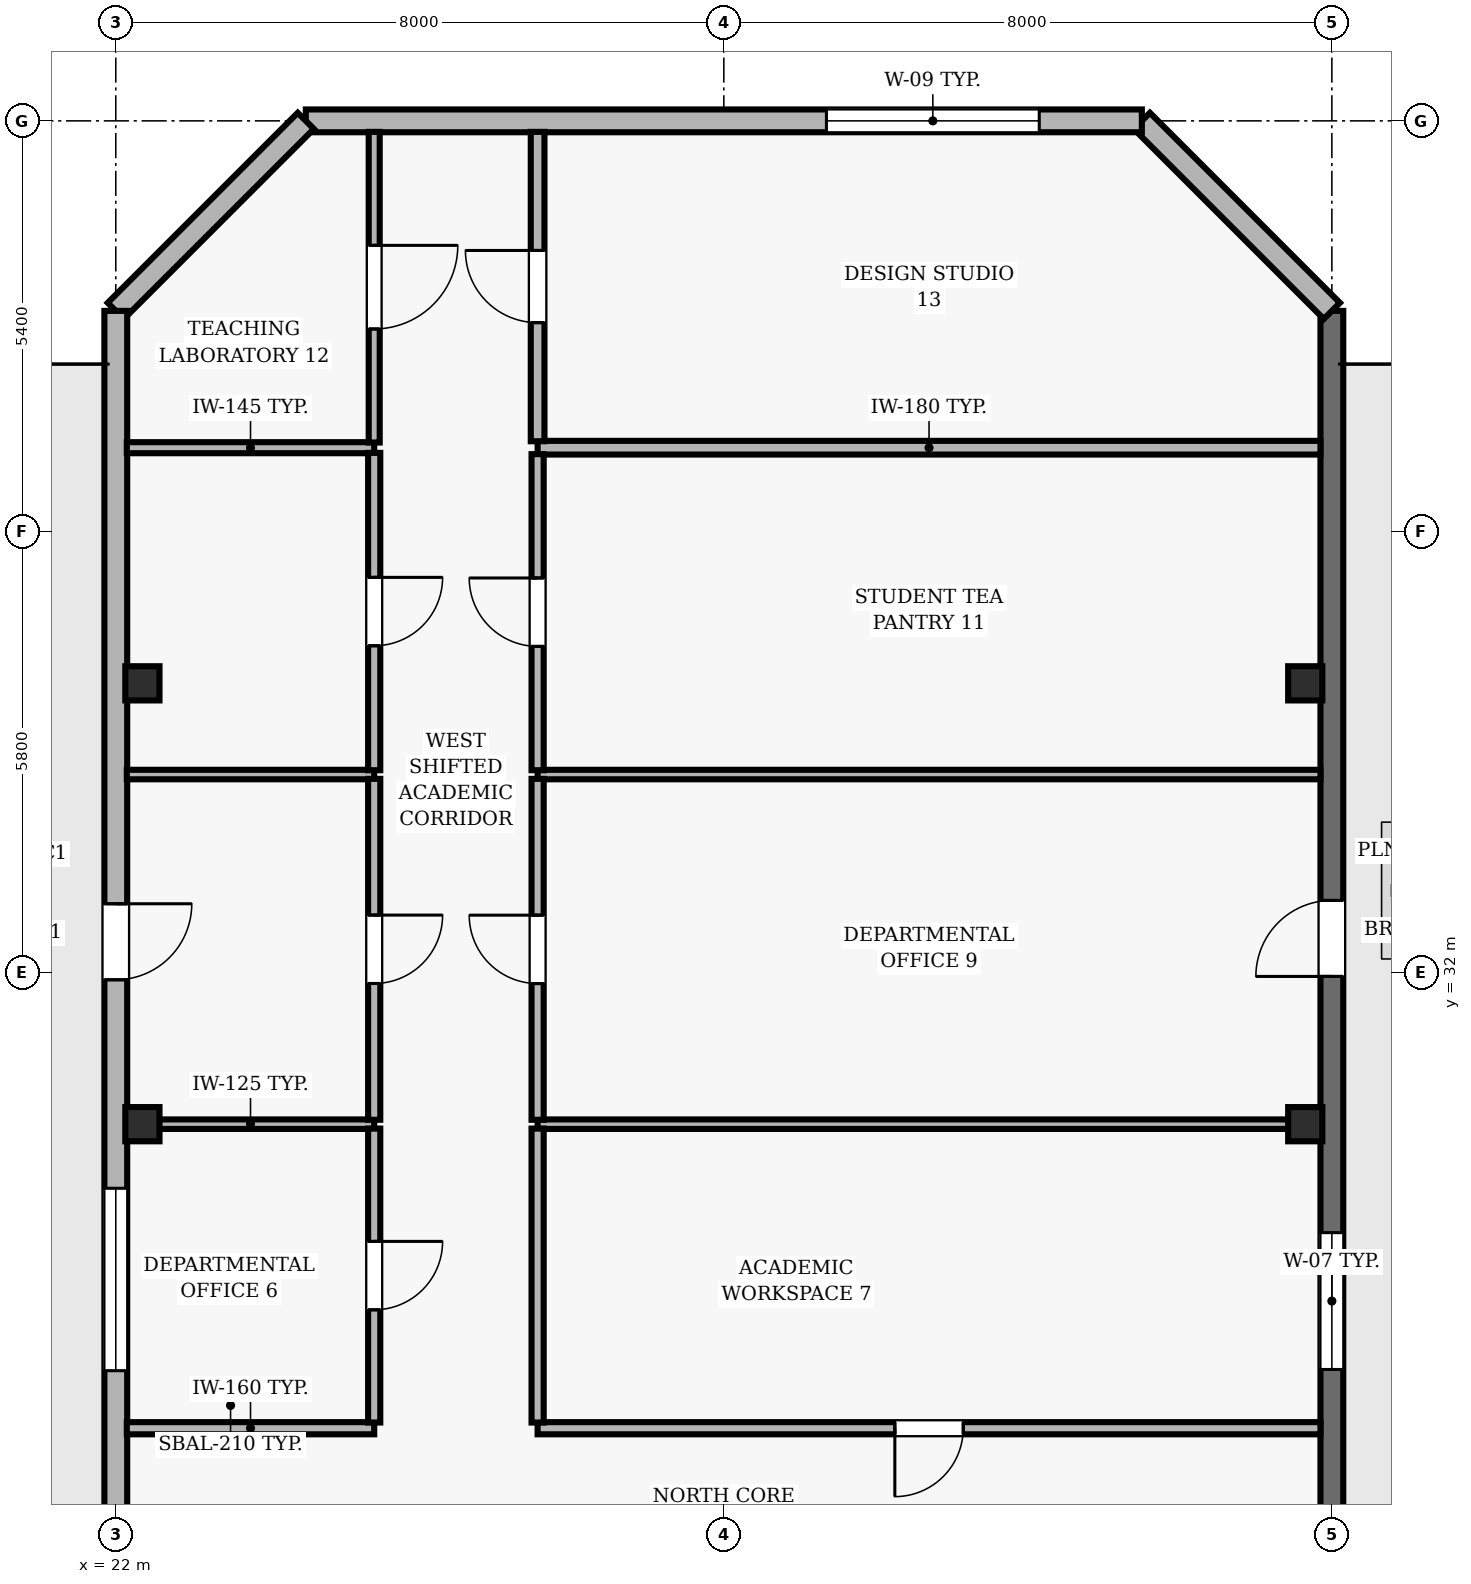
"""IFC4 building model, lengths in metres.
Left out: names, types, materials, properties, quantities, classifications, styles, units other than length and angle.
Written with IfcOpenShell. Run it as: python <this file> out.ifc"""

import sys

from ifc_helpers import new_model, si_unit, direction, frame, frame_2d, origin, origin_2d, place, context, subcontext, project, spatial, rectangle, hollow_rectangle, extrude, element, fill, save


model = new_model("IFC4")
c1 = context("Model", 3, precision=1e-05, world=origin(), true_north=direction((0.0, 1.0)))
c2 = subcontext(c1, "Body", "Model", "MODEL_VIEW")
j1 = project(units=[si_unit("LENGTHUNIT", "METRE"), si_unit("PLANEANGLEUNIT", "RADIAN")], contexts=[c1])
p1 = place(None, origin())
s1 = spatial("IfcSite", under=j1, at=p1, CompositionType="ELEMENT")
p2 = place(p1, origin())
s2 = spatial("IfcBuilding", under=s1, at=p2, CompositionType="ELEMENT")
p3 = place(p2, frame((0.0, 0.0, 191.4)))
s3 = spatial("IfcBuildingStorey", under=s2, at=p3, CompositionType="ELEMENT", Elevation=191.4)
for number, where, z_axis, x_axis in (
    (1, (22.35, 30.0, 0.0), (0.0, 0.0, 1.0), (1.0, 0.0, 0.0)),
    (2, (37.65, 30.0, 0.0), (0.0, 0.0, 1.0), (1.0, 0.0, 0.0)),
    (3, (22.35, 35.8, 0.0), (0.0, 0.0, 1.0), (1.0, 0.0, 0.0)),
    (4, (37.65, 35.8, 0.0), (0.0, 0.0, 1.0), (1.0, 0.0, 0.0)),
):
    element("IfcColumn", number, at=place(p3, frame(where, z_axis=z_axis, x_axis=x_axis)), inside=s3, PredefinedType="COLUMN", context=c2, shape_type="SweptSolid", body=[
        extrude(hollow_rectangle(XDim=0.45, YDim=0.45, WallThickness=0.02, at=origin_2d()), origin(), (0.0, 0.0, 1.0), 3.9),
    ])
p4 = place(p3, frame((38.0, 23.988, 0.0), z_axis=(0.0, 0.0, 1.0), x_axis=(0.0, 1.0, 0.0)))
e5 = element("IfcWall", 5, at=p4, inside=s3, PredefinedType="SOLIDWALL", context=c2, shape_type="SweptSolid", body=[
    extrude(rectangle(XDim=16.712, YDim=0.3, at=frame_2d((8.356, 0.0))), origin(), (0.0, 0.0, 1.0), 3.69),
])
p5 = place(p4, frame((7.956, 0.0, 0.0)))
e6 = element("IfcOpeningElement", 6, at=p5, cuts=e5, PredefinedType="OPENING", context=c2, shape_type="SweptSolid", body=[
    extrude(rectangle(XDim=1.0, YDim=2.2, at=frame_2d((0.5, 1.1))), frame((0.0, 0.16, 0.0), z_axis=(0.0, -1.0, 0.0), x_axis=(1.0, 0.0, 0.0)), (0.0, 0.0, 1.0), 0.32),
])
p6 = place(p4, frame((2.785, 0.0, 0.9)))
e7 = element("IfcOpeningElement", 7, at=p6, cuts=e5, PredefinedType="OPENING", context=c2, shape_type="SweptSolid", body=[
    extrude(rectangle(XDim=1.8, YDim=1.8, at=frame_2d((0.9, 0.9))), frame((0.0, 0.16, 0.0), z_axis=(0.0, -1.0, 0.0), x_axis=(1.0, 0.0, 0.0)), (0.0, 0.0, 1.0), 0.32),
])
p7 = place(p3, frame((38.0, 40.7, 0.0), z_axis=(0.0, 0.0, 1.0), x_axis=(-0.707106781187, 0.707106781187, 0.0)))
e8 = element("IfcWall", 8, at=p7, inside=s3, PredefinedType="SOLIDWALL", context=c2, shape_type="SweptSolid", body=[
    extrude(rectangle(XDim=3.536, YDim=0.3, at=frame_2d((1.768, 0.0))), origin(), (0.0, 0.0, 1.0), 3.69),
])
p8 = place(p3, frame((35.5, 43.2, 0.0), z_axis=(0.0, 0.0, 1.0), x_axis=(-1.0, 0.0, 0.0)))
e9 = element("IfcWall", 9, at=p8, inside=s3, PredefinedType="SOLIDWALL", context=c2, shape_type="SweptSolid", body=[
    extrude(rectangle(XDim=11.0, YDim=0.3, at=frame_2d((5.5, 0.0))), origin(), (0.0, 0.0, 1.0), 3.69),
])
p9 = place(p8, frame((1.35, 0.0, 0.9)))
e10 = element("IfcOpeningElement", 10, at=p9, cuts=e9, PredefinedType="OPENING", context=c2, shape_type="SweptSolid", body=[
    extrude(rectangle(XDim=2.8, YDim=1.8, at=frame_2d((1.4, 0.9))), frame((0.0, 0.16, 0.0), z_axis=(0.0, -1.0, 0.0), x_axis=(1.0, 0.0, 0.0)), (0.0, 0.0, 1.0), 0.32),
])
p10 = place(p3, frame((24.5, 43.2, 0.0), z_axis=(0.0, 0.0, 1.0), x_axis=(-0.707106781187, -0.707106781187, 0.0)))
e11 = element("IfcWall", 11, at=p10, inside=s3, PredefinedType="SOLIDWALL", context=c2, shape_type="SweptSolid", body=[
    extrude(rectangle(XDim=3.536, YDim=0.3, at=frame_2d((1.768, 0.0))), origin(), (0.0, 0.0, 1.0), 3.69),
])
p11 = place(p3, frame((22.0, 40.7, 0.0), z_axis=(0.0, 0.0, 1.0), x_axis=(0.0, -1.0, 0.0)))
e12 = element("IfcWall", 12, at=p11, inside=s3, PredefinedType="SOLIDWALL", context=c2, shape_type="SweptSolid", body=[
    extrude(rectangle(XDim=38.2, YDim=0.3, at=frame_2d((19.1, 0.0))), origin(), (0.0, 0.0, 1.0), 3.69),
])
p12 = place(p11, frame((7.8, 0.0, 0.0)))
e13 = element("IfcOpeningElement", 13, at=p12, cuts=e12, PredefinedType="OPENING", context=c2, shape_type="SweptSolid", body=[
    extrude(rectangle(XDim=1.0, YDim=2.2, at=frame_2d((0.5, 1.1))), frame((0.0, 0.16, 0.0), z_axis=(0.0, -1.0, 0.0), x_axis=(1.0, 0.0, 0.0)), (0.0, 0.0, 1.0), 0.32),
])
p13 = place(p11, frame((11.543, 0.0, 0.9)))
e14 = element("IfcOpeningElement", 14, at=p13, cuts=e12, PredefinedType="OPENING", context=c2, shape_type="SweptSolid", body=[
    extrude(rectangle(XDim=2.4, YDim=2.2, at=frame_2d((1.2, 1.1))), frame((0.0, 0.16, 0.0), z_axis=(0.0, -1.0, 0.0), x_axis=(1.0, 0.0, 0.0)), (0.0, 0.0, 1.0), 0.32),
])
p14 = place(p11, frame((18.35, 0.0, 0.9)))
e15 = element("IfcOpeningElement", 15, at=p14, cuts=e12, PredefinedType="OPENING", context=c2, shape_type="SweptSolid", body=[
    extrude(rectangle(XDim=2.4, YDim=2.2, at=frame_2d((1.2, 1.1))), frame((0.0, 0.16, 0.0), z_axis=(0.0, -1.0, 0.0), x_axis=(1.0, 0.0, 0.0)), (0.0, 0.0, 1.0), 0.32),
])
p15 = place(p11, frame((22.907, 0.0, 0.9)))
e16 = element("IfcOpeningElement", 16, at=p15, cuts=e12, PredefinedType="OPENING", context=c2, shape_type="SweptSolid", body=[
    extrude(rectangle(XDim=2.4, YDim=2.2, at=frame_2d((1.2, 1.1))), frame((0.0, 0.16, 0.0), z_axis=(0.0, -1.0, 0.0), x_axis=(1.0, 0.0, 0.0)), (0.0, 0.0, 1.0), 0.32),
])
p16 = place(p11, frame((28.814, 0.0, 0.9)))
e17 = element("IfcOpeningElement", 17, at=p16, cuts=e12, PredefinedType="OPENING", context=c2, shape_type="SweptSolid", body=[
    extrude(rectangle(XDim=2.4, YDim=2.2, at=frame_2d((1.2, 1.1))), frame((0.0, 0.16, 0.0), z_axis=(0.0, -1.0, 0.0), x_axis=(1.0, 0.0, 0.0)), (0.0, 0.0, 1.0), 0.32),
])
p17 = place(p3, frame((25.4, 26.0, 0.0), z_axis=(0.0, 0.0, 1.0), x_axis=(-1.0, 0.0, 0.0)))
e18 = element("IfcWall", 18, at=p17, inside=s3, PredefinedType="PARTITIONING", context=c2, shape_type="SweptSolid", body=[
    extrude(rectangle(XDim=3.255, YDim=0.16, at=frame_2d((1.627, 0.0))), origin(), (0.0, 0.0, 1.0), 3.69),
])
p18 = place(p3, frame((25.4, 30.0, 0.0), z_axis=(0.0, 0.0, 1.0), x_axis=(-1.0, 0.0, 0.0)))
e19 = element("IfcWall", 19, at=p18, inside=s3, PredefinedType="PARTITIONING", context=c2, shape_type="SweptSolid", body=[
    extrude(rectangle(XDim=3.255, YDim=0.125, at=frame_2d((1.627, 0.0))), origin(), (0.0, 0.0, 1.0), 3.139),
])
p19 = place(p3, frame((25.4, 34.6, 0.0), z_axis=(0.0, 0.0, 1.0), x_axis=(-1.0, 0.0, 0.0)))
e20 = element("IfcWall", 20, at=p19, inside=s3, PredefinedType="PARTITIONING", context=c2, shape_type="SweptSolid", body=[
    extrude(rectangle(XDim=3.255, YDim=0.125, at=frame_2d((1.627, 0.0))), origin(), (0.0, 0.0, 1.0), 3.69),
])
p20 = place(p3, frame((25.4, 38.9, 0.0), z_axis=(0.0, 0.0, 1.0), x_axis=(-1.0, 0.0, 0.0)))
e21 = element("IfcWall", 21, at=p20, inside=s3, PredefinedType="PARTITIONING", context=c2, shape_type="SweptSolid", body=[
    extrude(rectangle(XDim=3.255, YDim=0.145, at=frame_2d((1.627, 0.0))), origin(), (0.0, 0.0, 1.0), 3.69),
])
p21 = place(p3, frame((37.85, 26.0, 0.0), z_axis=(0.0, 0.0, 1.0), x_axis=(-1.0, 0.0, 0.0)))
e22 = element("IfcWall", 22, at=p21, inside=s3, PredefinedType="PARTITIONING", context=c2, shape_type="SweptSolid", body=[
    extrude(rectangle(XDim=10.3, YDim=0.16, at=frame_2d((5.15, 0.0))), origin(), (0.0, 0.0, 1.0), 3.69),
])
p22 = place(p21, frame((4.7, 0.0, 0.0)))
e23 = element("IfcOpeningElement", 23, at=p22, cuts=e22, PredefinedType="OPENING", context=c2, shape_type="SweptSolid", body=[
    extrude(rectangle(XDim=0.9, YDim=2.1, at=frame_2d((0.45, 1.05))), frame((0.0, 0.09, 0.0), z_axis=(0.0, -1.0, 0.0), x_axis=(1.0, 0.0, 0.0)), (0.0, 0.0, 1.0), 0.18),
])
p23 = place(p3, frame((37.85, 30.0, 0.0), z_axis=(0.0, 0.0, 1.0), x_axis=(-1.0, 0.0, 0.0)))
e24 = element("IfcWall", 24, at=p23, inside=s3, PredefinedType="PARTITIONING", context=c2, shape_type="SweptSolid", body=[
    extrude(rectangle(XDim=10.3, YDim=0.125, at=frame_2d((5.15, 0.0))), origin(), (0.0, 0.0, 1.0), 3.139),
])
p24 = place(p3, frame((37.85, 34.6, 0.0), z_axis=(0.0, 0.0, 1.0), x_axis=(-1.0, 0.0, 0.0)))
e25 = element("IfcWall", 25, at=p24, inside=s3, PredefinedType="PARTITIONING", context=c2, shape_type="SweptSolid", body=[
    extrude(rectangle(XDim=10.3, YDim=0.125, at=frame_2d((5.15, 0.0))), origin(), (0.0, 0.0, 1.0), 3.69),
])
p25 = place(p3, frame((37.85, 38.9, 0.0), z_axis=(0.0, 0.0, 1.0), x_axis=(-1.0, 0.0, 0.0)))
e26 = element("IfcWall", 26, at=p25, inside=s3, PredefinedType="PARTITIONING", context=c2, shape_type="SweptSolid", body=[
    extrude(rectangle(XDim=10.3, YDim=0.18, at=frame_2d((5.15, 0.0))), origin(), (0.0, 0.0, 1.0), 3.69),
])
p26 = place(p3, frame((25.4, 29.942, 0.0), z_axis=(0.0, 0.0, 1.0), x_axis=(0.0, -1.0, 0.0)))
e27 = element("IfcWall", 27, at=p26, inside=s3, PredefinedType="PARTITIONING", context=c2, shape_type="SweptSolid", body=[
    extrude(rectangle(XDim=3.867, YDim=0.16, at=frame_2d((1.934, 0.0))), origin(), (0.0, 0.0, 1.0), 3.69),
])
p27 = place(p26, frame((1.484, 0.0, 0.0)))
e28 = element("IfcOpeningElement", 28, at=p27, cuts=e27, PredefinedType="OPENING", context=c2, shape_type="SweptSolid", body=[
    extrude(rectangle(XDim=0.9, YDim=2.1, at=frame_2d((0.45, 1.05))), frame((0.0, 0.09, 0.0), z_axis=(0.0, -1.0, 0.0), x_axis=(1.0, 0.0, 0.0)), (0.0, 0.0, 1.0), 0.18),
])
p28 = place(p3, frame((25.4, 34.543, 0.0), z_axis=(0.0, 0.0, 1.0), x_axis=(0.0, -1.0, 0.0)))
e29 = element("IfcWall", 29, at=p28, inside=s3, PredefinedType="PARTITIONING", context=c2, shape_type="SweptSolid", body=[
    extrude(rectangle(XDim=4.485, YDim=0.16, at=frame_2d((2.242, 0.0))), origin(), (0.0, 0.0, 1.0), 3.69),
])
p29 = place(p28, frame((1.792, 0.0, 0.0)))
e30 = element("IfcOpeningElement", 30, at=p29, cuts=e29, PredefinedType="OPENING", context=c2, shape_type="SweptSolid", body=[
    extrude(rectangle(XDim=0.9, YDim=2.1, at=frame_2d((0.45, 1.05))), frame((0.0, 0.09, 0.0), z_axis=(0.0, -1.0, 0.0), x_axis=(1.0, 0.0, 0.0)), (0.0, 0.0, 1.0), 0.18),
])
p30 = place(p3, frame((25.4, 38.832, 0.0), z_axis=(0.0, 0.0, 1.0), x_axis=(0.0, -1.0, 0.0)))
e31 = element("IfcWall", 31, at=p30, inside=s3, PredefinedType="PARTITIONING", context=c2, shape_type="SweptSolid", body=[
    extrude(rectangle(XDim=4.175, YDim=0.16, at=frame_2d((2.087, 0.0))), origin(), (0.0, 0.0, 1.0), 3.69),
])
p31 = place(p30, frame((1.638, 0.0, 0.0)))
e32 = element("IfcOpeningElement", 32, at=p31, cuts=e31, PredefinedType="OPENING", context=c2, shape_type="SweptSolid", body=[
    extrude(rectangle(XDim=0.9, YDim=2.1, at=frame_2d((0.45, 1.05))), frame((0.0, 0.09, 0.0), z_axis=(0.0, -1.0, 0.0), x_axis=(1.0, 0.0, 0.0)), (0.0, 0.0, 1.0), 0.18),
])
p32 = place(p3, frame((25.4, 43.055, 0.0), z_axis=(0.0, 0.0, 1.0), x_axis=(0.0, -1.0, 0.0)))
e33 = element("IfcWall", 33, at=p32, inside=s3, PredefinedType="PARTITIONING", context=c2, shape_type="SweptSolid", body=[
    extrude(rectangle(XDim=4.087, YDim=0.145, at=frame_2d((2.043, 0.0))), origin(), (0.0, 0.0, 1.0), 3.69),
])
p33 = place(p32, frame((1.493, 0.0, 0.0)))
e34 = element("IfcOpeningElement", 34, at=p33, cuts=e33, PredefinedType="OPENING", context=c2, shape_type="SweptSolid", body=[
    extrude(rectangle(XDim=1.1, YDim=2.15, at=frame_2d((0.55, 1.075))), frame((0.0, 0.083, 0.0), z_axis=(0.0, -1.0, 0.0), x_axis=(1.0, 0.0, 0.0)), (0.0, 0.0, 1.0), 0.165),
])
p34 = place(p3, frame((27.55, 26.075, 0.0), z_axis=(0.0, 0.0, 1.0), x_axis=(0.0, 1.0, 0.0)))
e35 = element("IfcWall", 35, at=p34, inside=s3, PredefinedType="PARTITIONING", context=c2, shape_type="SweptSolid", body=[
    extrude(rectangle(XDim=3.867, YDim=0.16, at=frame_2d((1.934, 0.0))), origin(), (0.0, 0.0, 1.0), 3.69),
])
p35 = place(p3, frame((27.55, 30.058, 0.0), z_axis=(0.0, 0.0, 1.0), x_axis=(0.0, 1.0, 0.0)))
e36 = element("IfcWall", 36, at=p35, inside=s3, PredefinedType="PARTITIONING", context=c2, shape_type="SweptSolid", body=[
    extrude(rectangle(XDim=4.485, YDim=0.16, at=frame_2d((2.242, 0.0))), origin(), (0.0, 0.0, 1.0), 3.69),
])
p36 = place(p35, frame((1.792, 0.0, 0.0)))
e37 = element("IfcOpeningElement", 37, at=p36, cuts=e36, PredefinedType="OPENING", context=c2, shape_type="SweptSolid", body=[
    extrude(rectangle(XDim=0.9, YDim=2.1, at=frame_2d((0.45, 1.05))), frame((0.0, 0.09, 0.0), z_axis=(0.0, -1.0, 0.0), x_axis=(1.0, 0.0, 0.0)), (0.0, 0.0, 1.0), 0.18),
])
p37 = place(p3, frame((27.55, 34.657, 0.0), z_axis=(0.0, 0.0, 1.0), x_axis=(0.0, 1.0, 0.0)))
e38 = element("IfcWall", 38, at=p37, inside=s3, PredefinedType="PARTITIONING", context=c2, shape_type="SweptSolid", body=[
    extrude(rectangle(XDim=4.158, YDim=0.16, at=frame_2d((2.079, 0.0))), origin(), (0.0, 0.0, 1.0), 3.69),
])
p38 = place(p37, frame((1.629, 0.0, 0.0)))
e39 = element("IfcOpeningElement", 39, at=p38, cuts=e38, PredefinedType="OPENING", context=c2, shape_type="SweptSolid", body=[
    extrude(rectangle(XDim=0.9, YDim=2.1, at=frame_2d((0.45, 1.05))), frame((0.0, 0.09, 0.0), z_axis=(0.0, -1.0, 0.0), x_axis=(1.0, 0.0, 0.0)), (0.0, 0.0, 1.0), 0.18),
])
p39 = place(p3, frame((27.55, 38.985, 0.0), z_axis=(0.0, 0.0, 1.0), x_axis=(0.0, 1.0, 0.0)))
e40 = element("IfcWall", 40, at=p39, inside=s3, PredefinedType="PARTITIONING", context=c2, shape_type="SweptSolid", body=[
    extrude(rectangle(XDim=4.07, YDim=0.18, at=frame_2d((2.035, 0.0))), origin(), (0.0, 0.0, 1.0), 3.69),
])
p40 = place(p39, frame((1.56, 0.0, 0.0)))
e41 = element("IfcOpeningElement", 41, at=p40, cuts=e40, PredefinedType="OPENING", context=c2, shape_type="SweptSolid", body=[
    extrude(rectangle(XDim=0.95, YDim=2.1, at=frame_2d((0.475, 1.05))), frame((0.0, 0.1, 0.0), z_axis=(0.0, -1.0, 0.0), x_axis=(1.0, 0.0, 0.0)), (0.0, 0.0, 1.0), 0.2),
])
p41 = place(p5, origin())
e42 = element("IfcDoor", 42, at=p41, inside=s3, OperationType="SINGLE_SWING_LEFT", PredefinedType="DOOR", context=c2, shape_type="SweptSolid", body=[
    extrude(rectangle(XDim=1.0, YDim=2.2, at=frame_2d((0.5, 1.1))), frame((0.0, 0.025, 0.0), z_axis=(0.0, -1.0, 0.0), x_axis=(1.0, 0.0, 0.0)), (0.0, 0.0, 1.0), 0.05),
])
fill(e6, e42)
p42 = place(p6, origin())
e43 = element("IfcWindow", 43, at=p42, inside=s3, PartitioningType="SINGLE_PANEL", PredefinedType="WINDOW", context=c2, shape_type="SweptSolid", body=[
    extrude(rectangle(XDim=1.8, YDim=1.8, at=frame_2d((0.9, 0.9))), frame((0.0, 0.03, 0.0), z_axis=(0.0, -1.0, 0.0), x_axis=(1.0, 0.0, 0.0)), (0.0, 0.0, 1.0), 0.06),
])
fill(e7, e43)
p43 = place(p9, origin())
e44 = element("IfcWindow", 44, at=p43, inside=s3, PartitioningType="SINGLE_PANEL", PredefinedType="WINDOW", context=c2, shape_type="SweptSolid", body=[
    extrude(rectangle(XDim=2.8, YDim=1.8, at=frame_2d((1.4, 0.9))), frame((0.0, 0.03, 0.0), z_axis=(0.0, -1.0, 0.0), x_axis=(1.0, 0.0, 0.0)), (0.0, 0.0, 1.0), 0.06),
])
fill(e10, e44)
p44 = place(p12, origin())
e45 = element("IfcDoor", 45, at=p44, inside=s3, OperationType="SINGLE_SWING_LEFT", PredefinedType="DOOR", context=c2, shape_type="SweptSolid", body=[
    extrude(rectangle(XDim=1.0, YDim=2.2, at=frame_2d((0.5, 1.1))), frame((0.0, 0.025, 0.0), z_axis=(0.0, -1.0, 0.0), x_axis=(1.0, 0.0, 0.0)), (0.0, 0.0, 1.0), 0.05),
])
fill(e13, e45)
p45 = place(p13, origin())
e46 = element("IfcWindow", 46, at=p45, inside=s3, PartitioningType="SINGLE_PANEL", PredefinedType="WINDOW", context=c2, shape_type="SweptSolid", body=[
    extrude(rectangle(XDim=2.4, YDim=2.2, at=frame_2d((1.2, 1.1))), frame((0.0, 0.03, 0.0), z_axis=(0.0, -1.0, 0.0), x_axis=(1.0, 0.0, 0.0)), (0.0, 0.0, 1.0), 0.06),
])
fill(e14, e46)
p46 = place(p27, origin())
e47 = element("IfcDoor", 47, at=p46, inside=s3, OperationType="SINGLE_SWING_LEFT", PredefinedType="DOOR", context=c2, shape_type="SweptSolid", body=[
    extrude(rectangle(XDim=0.9, YDim=2.1, at=frame_2d((0.45, 1.05))), frame((0.0, 0.025, 0.0), z_axis=(0.0, -1.0, 0.0), x_axis=(1.0, 0.0, 0.0)), (0.0, 0.0, 1.0), 0.05),
])
fill(e28, e47)
p47 = place(p22, origin())
e48 = element("IfcDoor", 48, at=p47, inside=s3, OperationType="SINGLE_SWING_RIGHT", PredefinedType="DOOR", context=c2, shape_type="SweptSolid", body=[
    extrude(rectangle(XDim=0.9, YDim=2.1, at=frame_2d((0.45, 1.05))), frame((0.0, 0.025, 0.0), z_axis=(0.0, -1.0, 0.0), x_axis=(1.0, 0.0, 0.0)), (0.0, 0.0, 1.0), 0.05),
])
fill(e23, e48)
p48 = place(p29, origin())
e49 = element("IfcDoor", 49, at=p48, inside=s3, OperationType="SINGLE_SWING_LEFT", PredefinedType="DOOR", context=c2, shape_type="SweptSolid", body=[
    extrude(rectangle(XDim=0.9, YDim=2.1, at=frame_2d((0.45, 1.05))), frame((0.0, 0.025, 0.0), z_axis=(0.0, -1.0, 0.0), x_axis=(1.0, 0.0, 0.0)), (0.0, 0.0, 1.0), 0.05),
])
fill(e30, e49)
p49 = place(p36, origin())
e50 = element("IfcDoor", 50, at=p49, inside=s3, OperationType="SINGLE_SWING_RIGHT", PredefinedType="DOOR", context=c2, shape_type="SweptSolid", body=[
    extrude(rectangle(XDim=0.9, YDim=2.1, at=frame_2d((0.45, 1.05))), frame((0.0, 0.025, 0.0), z_axis=(0.0, -1.0, 0.0), x_axis=(1.0, 0.0, 0.0)), (0.0, 0.0, 1.0), 0.05),
])
fill(e37, e50)
p50 = place(p31, origin())
e51 = element("IfcDoor", 51, at=p50, inside=s3, OperationType="SINGLE_SWING_LEFT", PredefinedType="DOOR", context=c2, shape_type="SweptSolid", body=[
    extrude(rectangle(XDim=0.9, YDim=2.1, at=frame_2d((0.45, 1.05))), frame((0.0, 0.025, 0.0), z_axis=(0.0, -1.0, 0.0), x_axis=(1.0, 0.0, 0.0)), (0.0, 0.0, 1.0), 0.05),
])
fill(e32, e51)
p51 = place(p38, origin())
e52 = element("IfcDoor", 52, at=p51, inside=s3, OperationType="SINGLE_SWING_RIGHT", PredefinedType="DOOR", context=c2, shape_type="SweptSolid", body=[
    extrude(rectangle(XDim=0.9, YDim=2.1, at=frame_2d((0.45, 1.05))), frame((0.0, 0.025, 0.0), z_axis=(0.0, -1.0, 0.0), x_axis=(1.0, 0.0, 0.0)), (0.0, 0.0, 1.0), 0.05),
])
fill(e39, e52)
p52 = place(p33, origin())
e53 = element("IfcDoor", 53, at=p52, inside=s3, OperationType="SINGLE_SWING_LEFT", PredefinedType="DOOR", context=c2, shape_type="SweptSolid", body=[
    extrude(rectangle(XDim=1.1, YDim=2.15, at=frame_2d((0.55, 1.075))), frame((0.0, 0.025, 0.0), z_axis=(0.0, -1.0, 0.0), x_axis=(1.0, 0.0, 0.0)), (0.0, 0.0, 1.0), 0.05),
])
fill(e34, e53)
p53 = place(p40, origin())
e54 = element("IfcDoor", 54, at=p53, inside=s3, OperationType="SINGLE_SWING_RIGHT", PredefinedType="DOOR", context=c2, shape_type="SweptSolid", body=[
    extrude(rectangle(XDim=0.95, YDim=2.1, at=frame_2d((0.475, 1.05))), frame((0.0, 0.025, 0.0), z_axis=(0.0, -1.0, 0.0), x_axis=(1.0, 0.0, 0.0)), (0.0, 0.0, 1.0), 0.05),
])
fill(e41, e54)
save(model, sys.argv[1])
